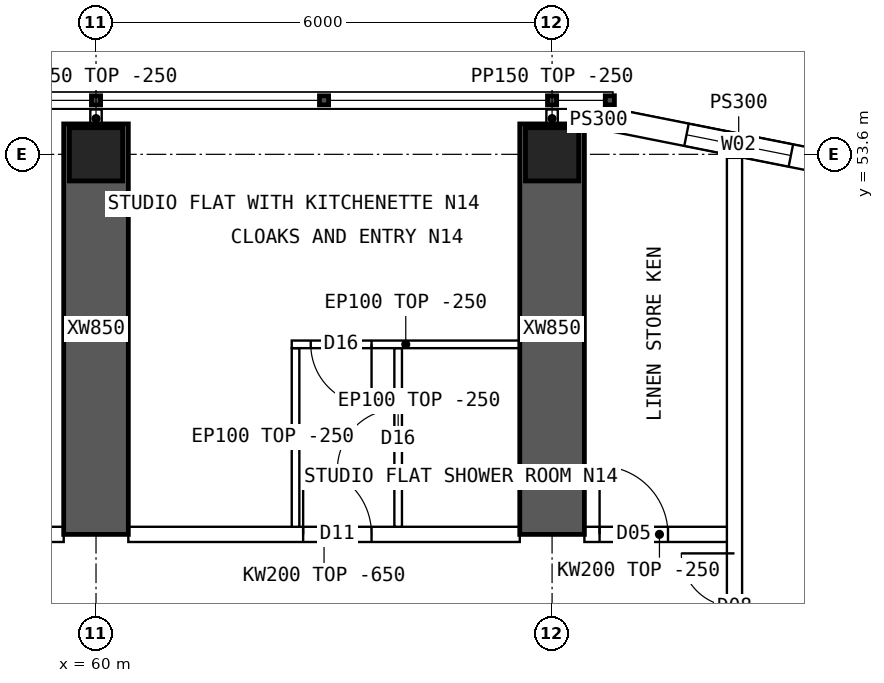
"""IFC4 building model, lengths in metres.
Left out: names, types, materials, properties, quantities, classifications, styles, units other than length and angle.
Written with IfcOpenShell. Run it as: python <this file> out.ifc"""

import sys

from ifc_helpers import new_model, si_unit, direction, frame, frame_2d, origin, origin_2d, place, context, subcontext, project, spatial, polyline, rectangle, hollow_rectangle, outline, extrude, element, fill, save


model = new_model("IFC4")
c1 = context("Model", 3, precision=1e-05, world=origin(), true_north=direction((0.0, 1.0)))
c2 = subcontext(c1, "Body", "Model", "MODEL_VIEW")
j1 = project(units=[si_unit("LENGTHUNIT", "METRE"), si_unit("PLANEANGLEUNIT", "RADIAN")], contexts=[c1])
p1 = place(None, origin())
s1 = spatial("IfcSite", under=j1, at=p1, CompositionType="ELEMENT")
p2 = place(p1, origin())
s2 = spatial("IfcBuilding", under=s1, at=p2, CompositionType="ELEMENT")
p3 = place(p2, frame((0.0, 0.0, 182.35)))
s3 = spatial("IfcBuildingStorey", under=s2, at=p3, CompositionType="ELEMENT", Elevation=182.35)
for number, where, z_axis, x_axis in (
    (1, (60.0, 53.6, 0.0), (0.0, 0.0, 1.0), (1.0, 0.0, 0.0)),
    (2, (66.0, 53.6, 0.0), (0.0, 0.0, 1.0), (1.0, 0.0, 0.0)),
):
    element("IfcColumn", number, at=place(p3, frame(where, z_axis=z_axis, x_axis=x_axis)), inside=s3, PredefinedType="COLUMN", context=c2, shape_type="SweptSolid", body=[
        extrude(hollow_rectangle(XDim=0.7, YDim=0.7, WallThickness=0.07, at=origin_2d()), origin(), (0.0, 0.0, 1.0), 3.75),
    ])
for number, where, z_axis, x_axis in (
    (3, (60.0, 48.6, 0.0), (0.0, 0.0, 1.0), (0.0, 1.0, 0.0)),
    (4, (66.0, 48.6, 0.0), (0.0, 0.0, 1.0), (0.0, 1.0, 0.0)),
):
    element("IfcWall", number, at=place(p3, frame(where, z_axis=z_axis, x_axis=x_axis)), inside=s3, PredefinedType="SHEAR", context=c2, shape_type="SweptSolid", body=[
        extrude(rectangle(XDim=5.4, YDim=0.85, at=frame_2d((2.7, 0.0))), origin(), (0.0, 0.0, 1.0), 3.75),
    ])
p4 = place(p3, frame((70.11, 53.392, 0.0), z_axis=(0.0, 0.0, 1.0), x_axis=(-0.98078325777, 0.195100490205, 0.0)))
e5 = element("IfcWall", 5, at=p4, inside=s3, PredefinedType="SOLIDWALL", context=c2, shape_type="SweptSolid", body=[
    extrude(outline(polyline([(-0.03, -0.15), (3.405, -0.15), (3.345, 0.15), (0.03, 0.15), (-0.03, -0.15)])), origin(), (0.0, 0.0, 1.0), 3.5),
])
p5 = place(p4, frame((0.988, 0.0, 0.9)))
e6 = element("IfcOpeningElement", 6, at=p5, cuts=e5, PredefinedType="OPENING", context=c2, shape_type="SweptSolid", body=[
    extrude(rectangle(XDim=1.4, YDim=1.8, at=frame_2d((0.7, 0.9))), frame((0.0, 0.16, 0.0), z_axis=(0.0, -1.0, 0.0), x_axis=(1.0, 0.0, 0.0)), (0.0, 0.0, 1.0), 0.32),
])
p6 = place(p3, frame((66.8, 54.05, 0.0), z_axis=(0.0, 0.0, 1.0), x_axis=(-1.0, 0.0, 0.0)))
e7 = element("IfcWall", 7, at=p6, inside=s3, PredefinedType="SOLIDWALL", context=c2, shape_type="SweptSolid", body=[
    extrude(rectangle(XDim=0.375, YDim=0.3, at=frame_2d((0.188, 0.0))), origin(), (0.0, 0.0, 1.0), 3.5),
])
p7 = place(p3, frame((54.425, 48.6, 0.0), z_axis=(0.0, 0.0, 1.0), x_axis=(1.0, 0.0, 0.0)))
e8 = element("IfcWall", 8, at=p7, inside=s3, PredefinedType="SOLIDWALL", context=c2, shape_type="SweptSolid", body=[
    extrude(outline(polyline([(0.0, 0.0), (5.15, 0.0), (5.15, 3.1), (0.0, 3.1), (0.0, 0.0)])), frame((0.0, 0.1, 0.0), z_axis=(0.0, -1.0, 0.0), x_axis=(1.0, 0.0, 0.0)), (0.0, 0.0, 1.0), 0.2),
])
p8 = place(p7, frame((2.6, 0.0, 0.0)))
e9 = element("IfcOpeningElement", 9, at=p8, cuts=e8, PredefinedType="OPENING", context=c2, shape_type="SweptSolid", body=[
    extrude(rectangle(XDim=0.9, YDim=2.1, at=frame_2d((0.45, 1.05))), frame((0.0, 0.11, 0.0), z_axis=(0.0, -1.0, 0.0), x_axis=(1.0, 0.0, 0.0)), (0.0, 0.0, 1.0), 0.22),
])
p9 = place(p3, frame((60.425, 48.6, 0.0), z_axis=(0.0, 0.0, 1.0), x_axis=(1.0, 0.0, 0.0)))
e10 = element("IfcWall", 10, at=p9, inside=s3, PredefinedType="SOLIDWALL", context=c2, shape_type="SweptSolid", body=[
    extrude(outline(polyline([(0.0, 0.0), (5.15, 0.0), (5.15, 3.1), (0.0, 3.1), (0.0, 0.0)])), frame((0.0, 0.1, 0.0), z_axis=(0.0, -1.0, 0.0), x_axis=(1.0, 0.0, 0.0)), (0.0, 0.0, 1.0), 0.2),
])
p10 = place(p9, frame((2.3, 0.0, 0.0)))
e11 = element("IfcOpeningElement", 11, at=p10, cuts=e10, PredefinedType="OPENING", context=c2, shape_type="SweptSolid", body=[
    extrude(rectangle(XDim=0.9, YDim=2.1, at=frame_2d((0.45, 1.05))), frame((0.0, 0.11, 0.0), z_axis=(0.0, -1.0, 0.0), x_axis=(1.0, 0.0, 0.0)), (0.0, 0.0, 1.0), 0.22),
])
p11 = place(p3, frame((66.425, 48.6, 0.0), z_axis=(0.0, 0.0, 1.0), x_axis=(1.0, 0.0, 0.0)))
e12 = element("IfcWall", 12, at=p11, inside=s3, PredefinedType="SOLIDWALL", context=c2, shape_type="SweptSolid", body=[
    extrude(rectangle(XDim=1.975, YDim=0.2, at=frame_2d((0.987, 0.0))), origin(), (0.0, 0.0, 1.0), 3.5),
])
p12 = place(p11, frame((0.2, 0.0, 0.0)))
e13 = element("IfcOpeningElement", 13, at=p12, cuts=e12, PredefinedType="OPENING", context=c2, shape_type="SweptSolid", body=[
    extrude(rectangle(XDim=0.9, YDim=2.1, at=frame_2d((0.45, 1.05))), frame((0.0, 0.11, 0.0), z_axis=(0.0, -1.0, 0.0), x_axis=(1.0, 0.0, 0.0)), (0.0, 0.0, 1.0), 0.22),
])
p13 = place(p3, frame((62.575, 51.1, 0.0), z_axis=(0.0, 0.0, 1.0), x_axis=(1.0, 0.0, 0.0)))
e14 = element("IfcWall", 14, at=p13, inside=s3, PredefinedType="PARTITIONING", context=c2, shape_type="SweptSolid", body=[
    extrude(rectangle(XDim=3.0, YDim=0.1, at=frame_2d((1.5, 0.0))), origin(), (0.0, 0.0, 1.0), 3.5),
])
p14 = place(p13, frame((0.25, 0.0, 0.0)))
e15 = element("IfcOpeningElement", 15, at=p14, cuts=e14, PredefinedType="OPENING", context=c2, shape_type="SweptSolid", body=[
    extrude(rectangle(XDim=0.8, YDim=2.1, at=frame_2d((0.4, 1.05))), frame((0.0, 0.06, 0.0), z_axis=(0.0, -1.0, 0.0), x_axis=(1.0, 0.0, 0.0)), (0.0, 0.0, 1.0), 0.12),
])
p15 = place(p3, frame((62.625, 51.05, 0.0), z_axis=(0.0, 0.0, 1.0), x_axis=(0.0, -1.0, 0.0)))
e16 = element("IfcWall", 16, at=p15, inside=s3, PredefinedType="PARTITIONING", context=c2, shape_type="SweptSolid", body=[
    extrude(outline(polyline([(0.0, 0.0), (2.35, 0.0), (2.35, 3.1), (2.302, 3.1), (2.3, 3.5), (0.0, 3.5), (0.0, 0.0)])), frame((0.0, 0.05, 0.0), z_axis=(0.0, -1.0, 0.0), x_axis=(1.0, 0.0, 0.0)), (0.0, 0.0, 1.0), 0.1),
])
p16 = place(p3, frame((63.975, 51.05, 0.0), z_axis=(0.0, 0.0, 1.0), x_axis=(0.0, -1.0, 0.0)))
e17 = element("IfcWall", 17, at=p16, inside=s3, PredefinedType="PARTITIONING", context=c2, shape_type="SweptSolid", body=[
    extrude(outline(polyline([(0.0, 0.0), (2.35, 0.0), (2.35, 3.1), (2.302, 3.1), (2.3, 3.5), (0.0, 3.5), (0.0, 0.0)])), frame((0.0, 0.05, 0.0), z_axis=(0.0, -1.0, 0.0), x_axis=(1.0, 0.0, 0.0)), (0.0, 0.0, 1.0), 0.1),
])
p17 = place(p16, frame((0.8, 0.0, 0.0)))
e18 = element("IfcOpeningElement", 18, at=p17, cuts=e17, PredefinedType="OPENING", context=c2, shape_type="SweptSolid", body=[
    extrude(rectangle(XDim=0.8, YDim=2.1, at=frame_2d((0.4, 1.05))), frame((0.0, 0.06, 0.0), z_axis=(0.0, -1.0, 0.0), x_axis=(1.0, 0.0, 0.0)), (0.0, 0.0, 1.0), 0.12),
])
p18 = place(p3, frame((68.4, 10.446, 0.0), z_axis=(0.0, 0.0, 1.0), x_axis=(0.0, 1.0, 0.0)))
e19 = element("IfcWall", 19, at=p18, inside=s3, PredefinedType="SOLIDWALL", context=c2, shape_type="SweptSolid", body=[
    extrude(rectangle(XDim=43.107, YDim=0.2, at=frame_2d((21.554, 0.0))), origin(), (0.0, 0.0, 1.0), 3.5),
])
p19 = place(p18, frame((5.104, 0.0, 0.0)))
e20 = element("IfcOpeningElement", 20, at=p19, cuts=e19, PredefinedType="OPENING", context=c2, shape_type="SweptSolid", body=[
    extrude(rectangle(XDim=1.4, YDim=2.1, at=frame_2d((0.7, 1.05))), frame((0.0, 0.11, 0.0), z_axis=(0.0, -1.0, 0.0), x_axis=(1.0, 0.0, 0.0)), (0.0, 0.0, 1.0), 0.22),
])
p20 = place(p18, frame((36.504, 0.0, 0.0)))
e21 = element("IfcOpeningElement", 21, at=p20, cuts=e19, PredefinedType="OPENING", context=c2, shape_type="SweptSolid", body=[
    extrude(rectangle(XDim=1.4, YDim=2.1, at=frame_2d((0.7, 1.05))), frame((0.0, 0.11, 0.0), z_axis=(0.0, -1.0, 0.0), x_axis=(1.0, 0.0, 0.0)), (0.0, 0.0, 1.0), 0.22),
])
for number, where, z_axis, x_axis in (
    (22, (60.0, 53.95, 0.0), (0.0, 0.0, 1.0), (0.0, 1.0, 0.0)),
    (23, (66.0, 53.95, 0.0), (0.0, 0.0, 1.0), (0.0, 1.0, 0.0)),
):
    element("IfcWall", number, at=place(p3, frame(where, z_axis=z_axis, x_axis=x_axis)), inside=s3, PredefinedType="PARTITIONING", context=c2, shape_type="SweptSolid", body=[
        extrude(rectangle(XDim=0.24, YDim=0.15, at=frame_2d((0.12, 0.0))), origin(), (0.0, 0.0, 1.0), 3.5),
    ])
p21 = place(p5, origin())
e24 = element("IfcWindow", 24, at=p21, inside=s3, PartitioningType="SINGLE_PANEL", PredefinedType="WINDOW", context=c2, shape_type="SweptSolid", body=[
    extrude(rectangle(XDim=1.4, YDim=1.8, at=frame_2d((0.7, 0.9))), frame((0.0, 0.03, 0.0), z_axis=(0.0, -1.0, 0.0), x_axis=(1.0, 0.0, 0.0)), (0.0, 0.0, 1.0), 0.06),
])
fill(e6, e24)
p22 = place(p14, origin())
e25 = element("IfcDoor", 25, at=p22, inside=s3, OperationType="SINGLE_SWING_RIGHT", PredefinedType="DOOR", context=c2, shape_type="SweptSolid", body=[
    extrude(rectangle(XDim=0.8, YDim=2.1, at=frame_2d((0.4, 1.05))), frame((0.0, 0.025, 0.0), z_axis=(0.0, -1.0, 0.0), x_axis=(1.0, 0.0, 0.0)), (0.0, 0.0, 1.0), 0.05),
])
fill(e15, e25)
p23 = place(p17, origin())
e26 = element("IfcDoor", 26, at=p23, inside=s3, OperationType="SINGLE_SWING_RIGHT", PredefinedType="DOOR", context=c2, shape_type="SweptSolid", body=[
    extrude(rectangle(XDim=0.8, YDim=2.1, at=frame_2d((0.4, 1.05))), frame((0.0, 0.025, 0.0), z_axis=(0.0, -1.0, 0.0), x_axis=(1.0, 0.0, 0.0)), (0.0, 0.0, 1.0), 0.05),
])
fill(e18, e26)
p24 = place(p10, origin())
e27 = element("IfcDoor", 27, at=p24, inside=s3, OperationType="SINGLE_SWING_LEFT", PredefinedType="DOOR", context=c2, shape_type="SweptSolid", body=[
    extrude(rectangle(XDim=0.9, YDim=2.1, at=frame_2d((0.45, 1.05))), frame((0.0, 0.025, 0.0), z_axis=(0.0, -1.0, 0.0), x_axis=(1.0, 0.0, 0.0)), (0.0, 0.0, 1.0), 0.05),
])
fill(e11, e27)
p25 = place(p20, origin())
e28 = element("IfcDoor", 28, at=p25, inside=s3, OperationType="DOUBLE_DOOR_SINGLE_SWING", PredefinedType="DOOR", context=c2, shape_type="SweptSolid", body=[
    extrude(rectangle(XDim=1.4, YDim=2.1, at=frame_2d((0.7, 1.05))), frame((0.0, 0.025, 0.0), z_axis=(0.0, -1.0, 0.0), x_axis=(1.0, 0.0, 0.0)), (0.0, 0.0, 1.0), 0.05),
])
fill(e21, e28)
p26 = place(p12, origin())
e29 = element("IfcDoor", 29, at=p26, inside=s3, OperationType="SINGLE_SWING_LEFT", PredefinedType="DOOR", context=c2, shape_type="SweptSolid", body=[
    extrude(rectangle(XDim=0.9, YDim=2.1, at=frame_2d((0.45, 1.05))), frame((0.0, 0.025, 0.0), z_axis=(0.0, -1.0, 0.0), x_axis=(1.0, 0.0, 0.0)), (0.0, 0.0, 1.0), 0.05),
])
fill(e13, e29)
save(model, sys.argv[1])
